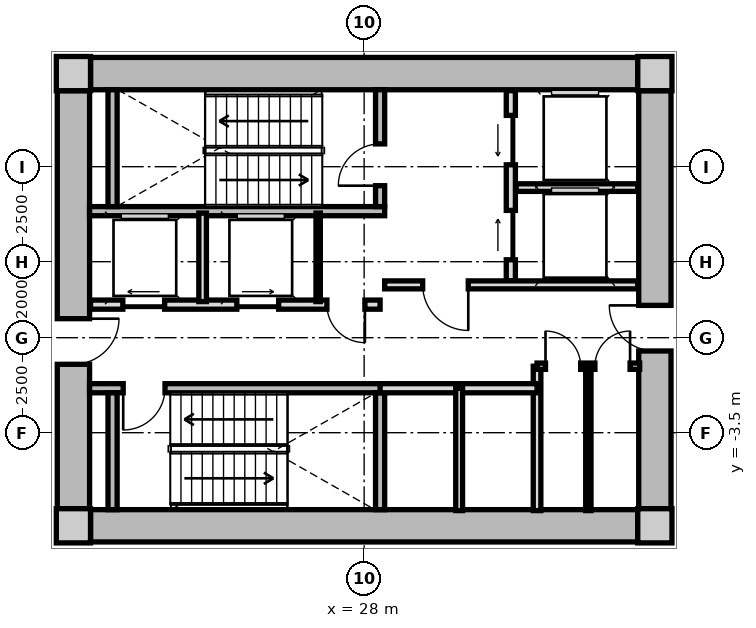
"""IFC4 building model, lengths in metres.
Left out: names, types, materials, properties, quantities, classifications, styles, units other than length and angle.
Written with IfcOpenShell. Run it as: python <this file> out.ifc"""

import sys

from ifc_helpers import new_model, si_unit, direction, frame, frame_2d, origin, origin_2d, place, context, subcontext, project, spatial, rectangle, extrude, source, transform, mapped, element, fill, save


model = new_model("IFC4")
c1 = context("Model", 3, precision=1e-05, world=origin(), true_north=direction((0.0, 1.0)))
c2 = subcontext(c1, "Body", "Model", "MODEL_VIEW")
j1 = project(units=[si_unit("LENGTHUNIT", "METRE"), si_unit("PLANEANGLEUNIT", "RADIAN")], contexts=[c1])
p1 = place(None, origin())
s1 = spatial("IfcSite", under=j1, at=p1, CompositionType="ELEMENT")
p2 = place(p1, origin())
s2 = spatial("IfcBuilding", under=s1, at=p2, CompositionType="ELEMENT")
p3 = place(p2, frame((0.0, 0.0, 12.6)))
s3 = spatial("IfcBuildingStorey", under=s2, at=p3, CompositionType="ELEMENT", Elevation=12.6)
m1 = source(origin(), c2, "Body", "SweptSolid", [
    extrude(rectangle(XDim=0.9, YDim=0.9, at=origin_2d()), origin(), (0.0, 0.0, 1.0), 4.2),
])
for number, where, z_axis, x_axis in (
    (1, (20.35, -5.95, 0.0), (0.0, 0.0, 1.0), (1.0, 0.0, 0.0)),
    (2, (35.65, -5.95, 0.0), (0.0, 0.0, 1.0), (1.0, 0.0, 0.0)),
    (3, (35.65, 5.95, 0.0), (0.0, 0.0, 1.0), (1.0, 0.0, 0.0)),
    (4, (20.35, 5.95, 0.0), (0.0, 0.0, 1.0), (1.0, 0.0, 0.0)),
):
    element("IfcColumn", number, at=place(p3, frame(where, z_axis=z_axis, x_axis=x_axis)), inside=s3, PredefinedType="COLUMN", context=c2, shape_type="MappedRepresentation", body=[
        mapped(m1, transform((0.0, 0.0, 0.0), x_axis=(1.0, 0.0, 0.0), y_axis=(0.0, 1.0, 0.0), z_axis=(0.0, 0.0, 1.0), scale=1.0)),
    ])
m2 = source(origin(), c2, "Body", "SweptSolid", [
    extrude(rectangle(XDim=14.4, YDim=0.85, at=frame_2d((7.2, 0.0))), origin(), (0.0, 0.0, 1.0), 3.88),
])
for number, where, z_axis, x_axis in (
    (5, (20.8, 5.95, 0.0), (0.0, 0.0, 1.0), (1.0, 0.0, 0.0)),
    (6, (35.2, -5.95, 0.0), (0.0, 0.0, 1.0), (-1.0, 0.0, 0.0)),
):
    element("IfcWall", number, at=place(p3, frame(where, z_axis=z_axis, x_axis=x_axis)), inside=s3, PredefinedType="SHEAR", context=c2, shape_type="MappedRepresentation", body=[
        mapped(m2, transform((0.0, 0.0, 0.0), x_axis=(1.0, 0.0, 0.0), y_axis=(0.0, 1.0, 0.0), z_axis=(0.0, 0.0, 1.0), scale=1.0)),
    ])
m3 = source(origin(), c2, "Body", "SweptSolid", [
    extrude(rectangle(XDim=11.0, YDim=0.85, at=frame_2d((5.5, 0.0))), origin(), (0.0, 0.0, 1.0), 3.88),
])
p4 = place(p3, frame((20.35, -5.5, 0.0), z_axis=(0.0, 0.0, 1.0), x_axis=(0.0, 1.0, 0.0)))
e7 = element("IfcWall", 7, at=p4, inside=s3, PredefinedType="SHEAR", context=c2, shape_type="MappedRepresentation", body=[
    mapped(m3, transform((0.0, 0.0, 0.0), x_axis=(1.0, 0.0, 0.0), y_axis=(0.0, 1.0, 0.0), z_axis=(0.0, 0.0, 1.0), scale=1.0)),
])
p5 = place(p4, frame((3.8, 0.0, 0.0)))
e8 = element("IfcOpeningElement", 8, at=p5, cuts=e7, PredefinedType="OPENING", context=c2, shape_type="SweptSolid", body=[
    extrude(rectangle(XDim=1.2, YDim=2.15, at=frame_2d((0.6, 1.075))), frame((0.0, 0.435, 0.0), z_axis=(0.0, -1.0, 0.0), x_axis=(1.0, 0.0, 0.0)), (0.0, 0.0, 1.0), 0.87),
])
p6 = place(p3, frame((35.65, 5.5, 0.0), z_axis=(0.0, 0.0, 1.0), x_axis=(0.0, -1.0, 0.0)))
e9 = element("IfcWall", 9, at=p6, inside=s3, PredefinedType="SHEAR", context=c2, shape_type="MappedRepresentation", body=[
    mapped(m3, transform((0.0, 0.0, 0.0), x_axis=(1.0, 0.0, 0.0), y_axis=(0.0, 1.0, 0.0), z_axis=(0.0, 0.0, 1.0), scale=1.0)),
])
p7 = place(p6, frame((5.65, 0.0, 0.0)))
e10 = element("IfcOpeningElement", 10, at=p7, cuts=e9, PredefinedType="OPENING", context=c2, shape_type="SweptSolid", body=[
    extrude(rectangle(XDim=1.2, YDim=2.15, at=frame_2d((0.6, 1.075))), frame((0.0, 0.435, 0.0), z_axis=(0.0, -1.0, 0.0), x_axis=(1.0, 0.0, 0.0)), (0.0, 0.0, 1.0), 0.87),
])
m4 = source(origin(), c2, "Body", "SweptSolid", [
    extrude(rectangle(XDim=7.765, YDim=0.24, at=frame_2d((3.883, 0.0))), origin(), (0.0, 0.0, 1.0), 3.88),
])
p8 = place(p3, frame((20.775, 2.33, 0.0), z_axis=(0.0, 0.0, 1.0), x_axis=(1.0, 0.0, 0.0)))
e11 = element("IfcWall", 11, at=p8, inside=s3, PredefinedType="PARTITIONING", context=c2, shape_type="MappedRepresentation", body=[
    mapped(m4, transform((0.0, 0.0, 0.0), x_axis=(1.0, 0.0, 0.0), y_axis=(0.0, 1.0, 0.0), z_axis=(0.0, 0.0, 1.0), scale=1.0)),
])
m5 = source(origin(), c2, "Body", "SweptSolid", [
    extrude(rectangle(XDim=3.075, YDim=0.24, at=frame_2d((1.538, 0.0))), origin(), (0.0, 0.0, 1.0), 3.88),
])
p9 = place(p3, frame((21.38, 2.45, 0.0), z_axis=(0.0, 0.0, 1.0), x_axis=(0.0, 1.0, 0.0)))
e12 = element("IfcWall", 12, at=p9, inside=s3, PredefinedType="PARTITIONING", context=c2, shape_type="MappedRepresentation", body=[
    mapped(m5, transform((0.0, 0.0, 0.0), x_axis=(1.0, 0.0, 0.0), y_axis=(0.0, 1.0, 0.0), z_axis=(0.0, 0.0, 1.0), scale=1.0)),
])
p10 = place(p3, frame((28.42, 2.45, 0.0), z_axis=(0.0, 0.0, 1.0), x_axis=(0.0, 1.0, 0.0)))
e13 = element("IfcWall", 13, at=p10, inside=s3, PredefinedType="PARTITIONING", context=c2, shape_type="MappedRepresentation", body=[
    mapped(m5, transform((0.0, 0.0, 0.0), x_axis=(1.0, 0.0, 0.0), y_axis=(0.0, 1.0, 0.0), z_axis=(0.0, 0.0, 1.0), scale=1.0)),
])
p11 = place(p10, frame((0.55, 0.0, 0.0)))
e14 = element("IfcOpeningElement", 14, at=p11, cuts=e13, PredefinedType="OPENING", context=c2, shape_type="SweptSolid", body=[
    extrude(rectangle(XDim=1.1, YDim=2.15, at=frame_2d((0.55, 1.075))), frame((0.0, 0.13, 0.0), z_axis=(0.0, -1.0, 0.0), x_axis=(1.0, 0.0, 0.0)), (0.0, 0.0, 1.0), 0.26),
])
p12 = place(p3, frame((20.775, -2.33, 0.0), z_axis=(0.0, 0.0, 1.0), x_axis=(1.0, 0.0, 0.0)))
e15 = element("IfcWall", 15, at=p12, inside=s3, PredefinedType="PARTITIONING", context=c2, shape_type="MappedRepresentation", body=[
    mapped(m4, transform((0.0, 0.0, 0.0), x_axis=(1.0, 0.0, 0.0), y_axis=(0.0, 1.0, 0.0), z_axis=(0.0, 0.0, 1.0), scale=1.0)),
])
p13 = place(p12, frame((0.885, 0.0, 0.0)))
e16 = element("IfcOpeningElement", 16, at=p13, cuts=e15, PredefinedType="OPENING", context=c2, shape_type="SweptSolid", body=[
    extrude(rectangle(XDim=1.1, YDim=2.15, at=frame_2d((0.55, 1.075))), frame((0.0, 0.13, 0.0), z_axis=(0.0, -1.0, 0.0), x_axis=(1.0, 0.0, 0.0)), (0.0, 0.0, 1.0), 0.26),
])
for number, where, z_axis, x_axis in (
    (17, (21.38, -5.525, 0.0), (0.0, 0.0, 1.0), (0.0, 1.0, 0.0)),
    (18, (28.42, -5.525, 0.0), (0.0, 0.0, 1.0), (0.0, 1.0, 0.0)),
):
    element("IfcWall", number, at=place(p3, frame(where, z_axis=z_axis, x_axis=x_axis)), inside=s3, PredefinedType="PARTITIONING", context=c2, shape_type="MappedRepresentation", body=[
        mapped(m5, transform((0.0, 0.0, 0.0), x_axis=(1.0, 0.0, 0.0), y_axis=(0.0, 1.0, 0.0), z_axis=(0.0, 0.0, 1.0), scale=1.0)),
    ])
m6 = source(origin(), c2, "Body", "SweptSolid", [
    extrude(rectangle(XDim=5.0, YDim=0.24, at=frame_2d((2.5, 0.0))), origin(), (0.0, 0.0, 1.0), 3.865),
])
p14 = place(p3, frame((31.86, 0.5, 0.0), z_axis=(0.0, 0.0, 1.0), x_axis=(0.0, 1.0, 0.0)))
e19 = element("IfcWall", 19, at=p14, inside=s3, PredefinedType="PARTITIONING", context=c2, shape_type="MappedRepresentation", body=[
    mapped(m6, transform((0.0, 0.0, 0.0), x_axis=(1.0, 0.0, 0.0), y_axis=(0.0, 1.0, 0.0), z_axis=(0.0, 0.0, 1.0), scale=1.0)),
])
p15 = place(p14, frame((3.05, 0.0, 0.0)))
e20 = element("IfcOpeningElement", 20, at=p15, cuts=e19, PredefinedType="OPENING", context=c2, shape_type="SweptSolid", body=[
    extrude(rectangle(XDim=1.3, YDim=2.2, at=frame_2d((0.65, 1.1))), frame((0.0, 0.13, 0.0), z_axis=(0.0, -1.0, 0.0), x_axis=(1.0, 0.0, 0.0)), (0.0, 0.0, 1.0), 0.26),
])
p16 = place(p14, frame((0.55, 0.0, 0.0)))
e21 = element("IfcOpeningElement", 21, at=p16, cuts=e19, PredefinedType="OPENING", context=c2, shape_type="SweptSolid", body=[
    extrude(rectangle(XDim=1.3, YDim=2.2, at=frame_2d((0.65, 1.1))), frame((0.0, 0.13, 0.0), z_axis=(0.0, -1.0, 0.0), x_axis=(1.0, 0.0, 0.0)), (0.0, 0.0, 1.0), 0.26),
])
m7 = source(origin(), c2, "Body", "SweptSolid", [
    extrude(rectangle(XDim=3.2, YDim=0.2, at=frame_2d((1.6, 0.0))), origin(), (0.0, 0.0, 1.0), 3.865),
])
p17 = place(p3, frame((32.0, 2.95, 0.0), z_axis=(0.0, 0.0, 1.0), x_axis=(1.0, 0.0, 0.0)))
e22 = element("IfcWall", 22, at=p17, inside=s3, PredefinedType="PARTITIONING", context=c2, shape_type="MappedRepresentation", body=[
    mapped(m7, transform((0.0, 0.0, 0.0), x_axis=(1.0, 0.0, 0.0), y_axis=(0.0, 1.0, 0.0), z_axis=(0.0, 0.0, 1.0), scale=1.0)),
])
m8 = source(origin(), c2, "Body", "SweptSolid", [
    extrude(rectangle(XDim=6.66, YDim=0.21, at=frame_2d((3.33, 0.0))), origin(), (0.0, 0.0, 1.0), 3.865),
])
p18 = place(p3, frame((28.54, 0.39, 0.0), z_axis=(0.0, 0.0, 1.0), x_axis=(1.0, 0.0, 0.0)))
e23 = element("IfcWall", 23, at=p18, inside=s3, PredefinedType="PARTITIONING", context=c2, shape_type="MappedRepresentation", body=[
    mapped(m8, transform((0.0, 0.0, 0.0), x_axis=(1.0, 0.0, 0.0), y_axis=(0.0, 1.0, 0.0), z_axis=(0.0, 0.0, 1.0), scale=1.0)),
])
p19 = place(p18, frame((1.0, 0.0, 0.0)))
e24 = element("IfcOpeningElement", 24, at=p19, cuts=e23, PredefinedType="OPENING", context=c2, shape_type="SweptSolid", body=[
    extrude(rectangle(XDim=1.2, YDim=2.15, at=frame_2d((0.6, 1.075))), frame((0.0, 0.115, 0.0), z_axis=(0.0, -1.0, 0.0), x_axis=(1.0, 0.0, 0.0)), (0.0, 0.0, 1.0), 0.23),
])
m9 = source(origin(), c2, "Body", "SweptSolid", [
    extrude(rectangle(XDim=7.62, YDim=0.24, at=frame_2d((3.81, 0.0))), origin(), (0.0, 0.0, 1.0), 3.865),
])
p20 = place(p3, frame((20.8, -0.13, 0.0), z_axis=(0.0, 0.0, 1.0), x_axis=(1.0, 0.0, 0.0)))
e25 = element("IfcWall", 25, at=p20, inside=s3, PredefinedType="PARTITIONING", context=c2, shape_type="MappedRepresentation", body=[
    mapped(m9, transform((0.0, 0.0, 0.0), x_axis=(1.0, 0.0, 0.0), y_axis=(0.0, 1.0, 0.0), z_axis=(0.0, 0.0, 1.0), scale=1.0)),
])
p21 = place(p20, frame((6.22, 0.0, 0.0)))
e26 = element("IfcOpeningElement", 26, at=p21, cuts=e25, PredefinedType="OPENING", context=c2, shape_type="SweptSolid", body=[
    extrude(rectangle(XDim=1.0, YDim=2.1, at=frame_2d((0.5, 1.05))), frame((0.0, 0.13, 0.0), z_axis=(0.0, -1.0, 0.0), x_axis=(1.0, 0.0, 0.0)), (0.0, 0.0, 1.0), 0.26),
])
p22 = place(p20, frame((0.85, 0.0, 0.0)))
e27 = element("IfcOpeningElement", 27, at=p22, cuts=e25, PredefinedType="OPENING", context=c2, shape_type="SweptSolid", body=[
    extrude(rectangle(XDim=1.1, YDim=2.2, at=frame_2d((0.55, 1.1))), frame((0.0, 0.13, 0.0), z_axis=(0.0, -1.0, 0.0), x_axis=(1.0, 0.0, 0.0)), (0.0, 0.0, 1.0), 0.26),
])
p23 = place(p20, frame((3.85, 0.0, 0.0)))
e28 = element("IfcOpeningElement", 28, at=p23, cuts=e25, PredefinedType="OPENING", context=c2, shape_type="SweptSolid", body=[
    extrude(rectangle(XDim=1.1, YDim=2.2, at=frame_2d((0.55, 1.1))), frame((0.0, 0.13, 0.0), z_axis=(0.0, -1.0, 0.0), x_axis=(1.0, 0.0, 0.0)), (0.0, 0.0, 1.0), 0.26),
])
m10 = source(origin(), c2, "Body", "SweptSolid", [
    extrude(rectangle(XDim=2.33, YDim=0.115, at=frame_2d((1.165, 0.0))), origin(), (0.0, 0.0, 1.0), 3.865),
])
p24 = place(p3, frame((26.79, -0.05, 0.0), z_axis=(0.0, 0.0, 1.0), x_axis=(0.0, 1.0, 0.0)))
e29 = element("IfcWall", 29, at=p24, inside=s3, PredefinedType="PARTITIONING", context=c2, shape_type="MappedRepresentation", body=[
    mapped(m10, transform((0.0, 0.0, 0.0), x_axis=(1.0, 0.0, 0.0), y_axis=(0.0, 1.0, 0.0), z_axis=(0.0, 0.0, 1.0), scale=1.0)),
])
m11 = source(origin(), c2, "Body", "SweptSolid", [
    extrude(rectangle(XDim=2.33, YDim=0.2, at=frame_2d((1.165, 0.0))), origin(), (0.0, 0.0, 1.0), 3.865),
])
p25 = place(p3, frame((23.75, -0.05, 0.0), z_axis=(0.0, 0.0, 1.0), x_axis=(0.0, 1.0, 0.0)))
e30 = element("IfcWall", 30, at=p25, inside=s3, PredefinedType="PARTITIONING", context=c2, shape_type="MappedRepresentation", body=[
    mapped(m11, transform((0.0, 0.0, 0.0), x_axis=(1.0, 0.0, 0.0), y_axis=(0.0, 1.0, 0.0), z_axis=(0.0, 0.0, 1.0), scale=1.0)),
])
m12 = source(origin(), c2, "Body", "SweptSolid", [
    extrude(rectangle(XDim=3.8, YDim=0.2, at=frame_2d((1.9, 0.0))), origin(), (0.0, 0.0, 1.0), 3.865),
])
p26 = place(p3, frame((32.55, -5.55, 0.0), z_axis=(0.0, 0.0, 1.0), x_axis=(0.0, 1.0, 0.0)))
e31 = element("IfcWall", 31, at=p26, inside=s3, PredefinedType="PARTITIONING", context=c2, shape_type="MappedRepresentation", body=[
    mapped(m12, transform((0.0, 0.0, 0.0), x_axis=(1.0, 0.0, 0.0), y_axis=(0.0, 1.0, 0.0), z_axis=(0.0, 0.0, 1.0), scale=1.0)),
])
m13 = source(origin(), c2, "Body", "SweptSolid", [
    extrude(rectangle(XDim=4.13, YDim=0.24, at=frame_2d((2.065, 0.0))), origin(), (0.0, 0.0, 1.0), 3.865),
])
p27 = place(p3, frame((28.42, -2.33, 0.0), z_axis=(0.0, 0.0, 1.0), x_axis=(1.0, 0.0, 0.0)))
e32 = element("IfcWall", 32, at=p27, inside=s3, PredefinedType="PARTITIONING", context=c2, shape_type="MappedRepresentation", body=[
    mapped(m13, transform((0.0, 0.0, 0.0), x_axis=(1.0, 0.0, 0.0), y_axis=(0.0, 1.0, 0.0), z_axis=(0.0, 0.0, 1.0), scale=1.0)),
])
m14 = source(origin(), c2, "Body", "SweptSolid", [
    extrude(rectangle(XDim=3.22, YDim=0.18, at=frame_2d((1.61, 0.0))), origin(), (0.0, 0.0, 1.0), 3.865),
])
p28 = place(p3, frame((30.5, -5.55, 0.0), z_axis=(0.0, 0.0, 1.0), x_axis=(0.0, 1.0, 0.0)))
e33 = element("IfcWall", 33, at=p28, inside=s3, PredefinedType="PARTITIONING", context=c2, shape_type="MappedRepresentation", body=[
    mapped(m14, transform((0.0, 0.0, 0.0), x_axis=(1.0, 0.0, 0.0), y_axis=(0.0, 1.0, 0.0), z_axis=(0.0, 0.0, 1.0), scale=1.0)),
])
m15 = source(origin(), c2, "Body", "SweptSolid", [
    extrude(rectangle(XDim=2.7, YDim=0.165, at=frame_2d((1.35, 0.0))), origin(), (0.0, 0.0, 1.0), 3.865),
])
p29 = place(p3, frame((32.55, -1.75, 0.0), z_axis=(0.0, 0.0, 1.0), x_axis=(1.0, 0.0, 0.0)))
e34 = element("IfcWall", 34, at=p29, inside=s3, PredefinedType="PARTITIONING", context=c2, shape_type="MappedRepresentation", body=[
    mapped(m15, transform((0.0, 0.0, 0.0), x_axis=(1.0, 0.0, 0.0), y_axis=(0.0, 1.0, 0.0), z_axis=(0.0, 0.0, 1.0), scale=1.0)),
])
p30 = place(p29, frame((0.222, 0.0, 0.0)))
e35 = element("IfcOpeningElement", 35, at=p30, cuts=e34, PredefinedType="OPENING", context=c2, shape_type="SweptSolid", body=[
    extrude(rectangle(XDim=0.925, YDim=2.1, at=frame_2d((0.462, 1.05))), frame((0.0, 0.093, 0.0), z_axis=(0.0, -1.0, 0.0), x_axis=(1.0, 0.0, 0.0)), (0.0, 0.0, 1.0), 0.185),
])
p31 = place(p29, frame((1.522, 0.0, 0.0)))
e36 = element("IfcOpeningElement", 36, at=p31, cuts=e34, PredefinedType="OPENING", context=c2, shape_type="SweptSolid", body=[
    extrude(rectangle(XDim=0.925, YDim=2.1, at=frame_2d((0.462, 1.05))), frame((0.0, 0.093, 0.0), z_axis=(0.0, -1.0, 0.0), x_axis=(1.0, 0.0, 0.0)), (0.0, 0.0, 1.0), 0.185),
])
m16 = source(origin(), c2, "Body", "SweptSolid", [
    extrude(rectangle(XDim=3.8, YDim=0.14, at=frame_2d((1.9, 0.0))), origin(), (0.0, 0.0, 1.0), 3.865),
])
p32 = place(p3, frame((33.9, -5.55, 0.0), z_axis=(0.0, 0.0, 1.0), x_axis=(0.0, 1.0, 0.0)))
e37 = element("IfcWall", 37, at=p32, inside=s3, PredefinedType="PARTITIONING", context=c2, shape_type="MappedRepresentation", body=[
    mapped(m16, transform((0.0, 0.0, 0.0), x_axis=(1.0, 0.0, 0.0), y_axis=(0.0, 1.0, 0.0), z_axis=(0.0, 0.0, 1.0), scale=1.0)),
])
m17 = source(origin(), c2, "Body", "SweptSolid", [
    extrude(rectangle(XDim=1.1, YDim=2.15, at=frame_2d((0.55, 1.075))), frame((0.0, 0.025, 0.0), z_axis=(0.0, -1.0, 0.0), x_axis=(1.0, 0.0, 0.0)), (0.0, 0.0, 1.0), 0.05),
])
p33 = place(p11, origin())
e38 = element("IfcDoor", 38, at=p33, inside=s3, OperationType="SINGLE_SWING_LEFT", PredefinedType="DOOR", context=c2, shape_type="MappedRepresentation", body=[
    mapped(m17, transform((0.0, 0.0, 0.0), x_axis=(1.0, 0.0, 0.0), y_axis=(0.0, 1.0, 0.0), z_axis=(0.0, 0.0, 1.0), scale=1.0)),
])
fill(e14, e38)
p34 = place(p13, frame((1.1, 0.0, 0.0), z_axis=(0.0, 0.0, 1.0), x_axis=(-1.0, 0.0, 0.0)))
e39 = element("IfcDoor", 39, at=p34, inside=s3, OperationType="SINGLE_SWING_RIGHT", PredefinedType="DOOR", context=c2, shape_type="MappedRepresentation", body=[
    mapped(m17, transform((0.0, 0.0, 0.0), x_axis=(1.0, 0.0, 0.0), y_axis=(0.0, 1.0, 0.0), z_axis=(0.0, 0.0, 1.0), scale=1.0)),
])
fill(e16, e39)
m18 = source(origin(), c2, "Body", "SweptSolid", [
    extrude(rectangle(XDim=1.3, YDim=2.2, at=frame_2d((0.65, 1.1))), frame((0.0, 0.025, 0.0), z_axis=(0.0, -1.0, 0.0), x_axis=(1.0, 0.0, 0.0)), (0.0, 0.0, 1.0), 0.05),
])
p35 = place(p15, origin())
e40 = element("IfcDoor", 40, at=p35, inside=s3, OperationType="SLIDING_TO_LEFT", PredefinedType="DOOR", context=c2, shape_type="MappedRepresentation", body=[
    mapped(m18, transform((0.0, 0.0, 0.0), x_axis=(1.0, 0.0, 0.0), y_axis=(0.0, 1.0, 0.0), z_axis=(0.0, 0.0, 1.0), scale=1.0)),
])
fill(e20, e40)
p36 = place(p16, origin())
e41 = element("IfcDoor", 41, at=p36, inside=s3, OperationType="SLIDING_TO_RIGHT", PredefinedType="DOOR", context=c2, shape_type="MappedRepresentation", body=[
    mapped(m18, transform((0.0, 0.0, 0.0), x_axis=(1.0, 0.0, 0.0), y_axis=(0.0, 1.0, 0.0), z_axis=(0.0, 0.0, 1.0), scale=1.0)),
])
fill(e21, e41)
m19 = source(origin(), c2, "Body", "SweptSolid", [
    extrude(rectangle(XDim=1.2, YDim=2.15, at=frame_2d((0.6, 1.075))), frame((0.0, 0.025, 0.0), z_axis=(0.0, -1.0, 0.0), x_axis=(1.0, 0.0, 0.0)), (0.0, 0.0, 1.0), 0.05),
])
p37 = place(p19, frame((1.2, 0.0, 0.0), z_axis=(0.0, 0.0, 1.0), x_axis=(-1.0, 0.0, 0.0)))
e42 = element("IfcDoor", 42, at=p37, inside=s3, OperationType="SINGLE_SWING_LEFT", PredefinedType="DOOR", context=c2, shape_type="MappedRepresentation", body=[
    mapped(m19, transform((0.0, 0.0, 0.0), x_axis=(1.0, 0.0, 0.0), y_axis=(0.0, 1.0, 0.0), z_axis=(0.0, 0.0, 1.0), scale=1.0)),
])
fill(e24, e42)
p38 = place(p5, frame((1.2, 0.0, 0.0), z_axis=(0.0, 0.0, 1.0), x_axis=(-1.0, 0.0, 0.0)))
e43 = element("IfcDoor", 43, at=p38, inside=s3, OperationType="SINGLE_SWING_LEFT", PredefinedType="DOOR", context=c2, shape_type="MappedRepresentation", body=[
    mapped(m19, transform((0.0, 0.0, 0.0), x_axis=(1.0, 0.0, 0.0), y_axis=(0.0, 1.0, 0.0), z_axis=(0.0, 0.0, 1.0), scale=1.0)),
])
fill(e8, e43)
p39 = place(p7, frame((1.2, 0.0, 0.0), z_axis=(0.0, 0.0, 1.0), x_axis=(-1.0, 0.0, 0.0)))
e44 = element("IfcDoor", 44, at=p39, inside=s3, OperationType="SINGLE_SWING_RIGHT", PredefinedType="DOOR", context=c2, shape_type="MappedRepresentation", body=[
    mapped(m19, transform((0.0, 0.0, 0.0), x_axis=(1.0, 0.0, 0.0), y_axis=(0.0, 1.0, 0.0), z_axis=(0.0, 0.0, 1.0), scale=1.0)),
])
fill(e10, e44)
m20 = source(origin(), c2, "Body", "SweptSolid", [
    extrude(rectangle(XDim=1.0, YDim=2.1, at=frame_2d((0.5, 1.05))), frame((0.0, 0.025, 0.0), z_axis=(0.0, -1.0, 0.0), x_axis=(1.0, 0.0, 0.0)), (0.0, 0.0, 1.0), 0.05),
])
p40 = place(p21, frame((1.0, 0.0, 0.0), z_axis=(0.0, 0.0, 1.0), x_axis=(-1.0, 0.0, 0.0)))
e45 = element("IfcDoor", 45, at=p40, inside=s3, OperationType="SINGLE_SWING_LEFT", PredefinedType="DOOR", context=c2, shape_type="MappedRepresentation", body=[
    mapped(m20, transform((0.0, 0.0, 0.0), x_axis=(1.0, 0.0, 0.0), y_axis=(0.0, 1.0, 0.0), z_axis=(0.0, 0.0, 1.0), scale=1.0)),
])
fill(e26, e45)
m21 = source(origin(), c2, "Body", "SweptSolid", [
    extrude(rectangle(XDim=1.1, YDim=2.2, at=frame_2d((0.55, 1.1))), frame((0.0, 0.025, 0.0), z_axis=(0.0, -1.0, 0.0), x_axis=(1.0, 0.0, 0.0)), (0.0, 0.0, 1.0), 0.05),
])
p41 = place(p22, origin())
e46 = element("IfcDoor", 46, at=p41, inside=s3, OperationType="SLIDING_TO_LEFT", PredefinedType="DOOR", context=c2, shape_type="MappedRepresentation", body=[
    mapped(m21, transform((0.0, 0.0, 0.0), x_axis=(1.0, 0.0, 0.0), y_axis=(0.0, 1.0, 0.0), z_axis=(0.0, 0.0, 1.0), scale=1.0)),
])
fill(e27, e46)
p42 = place(p23, origin())
e47 = element("IfcDoor", 47, at=p42, inside=s3, OperationType="SLIDING_TO_RIGHT", PredefinedType="DOOR", context=c2, shape_type="MappedRepresentation", body=[
    mapped(m21, transform((0.0, 0.0, 0.0), x_axis=(1.0, 0.0, 0.0), y_axis=(0.0, 1.0, 0.0), z_axis=(0.0, 0.0, 1.0), scale=1.0)),
])
fill(e28, e47)
m22 = source(origin(), c2, "Body", "SweptSolid", [
    extrude(rectangle(XDim=0.925, YDim=2.1, at=frame_2d((0.462, 1.05))), frame((0.0, 0.025, 0.0), z_axis=(0.0, -1.0, 0.0), x_axis=(1.0, 0.0, 0.0)), (0.0, 0.0, 1.0), 0.05),
])
p43 = place(p30, origin())
e48 = element("IfcDoor", 48, at=p43, inside=s3, OperationType="SINGLE_SWING_LEFT", PredefinedType="DOOR", context=c2, shape_type="MappedRepresentation", body=[
    mapped(m22, transform((0.0, 0.0, 0.0), x_axis=(1.0, 0.0, 0.0), y_axis=(0.0, 1.0, 0.0), z_axis=(0.0, 0.0, 1.0), scale=1.0)),
])
fill(e35, e48)
p44 = place(p31, origin())
e49 = element("IfcDoor", 49, at=p44, inside=s3, OperationType="SINGLE_SWING_RIGHT", PredefinedType="DOOR", context=c2, shape_type="MappedRepresentation", body=[
    mapped(m22, transform((0.0, 0.0, 0.0), x_axis=(1.0, 0.0, 0.0), y_axis=(0.0, 1.0, 0.0), z_axis=(0.0, 0.0, 1.0), scale=1.0)),
])
fill(e36, e49)
save(model, sys.argv[1])
